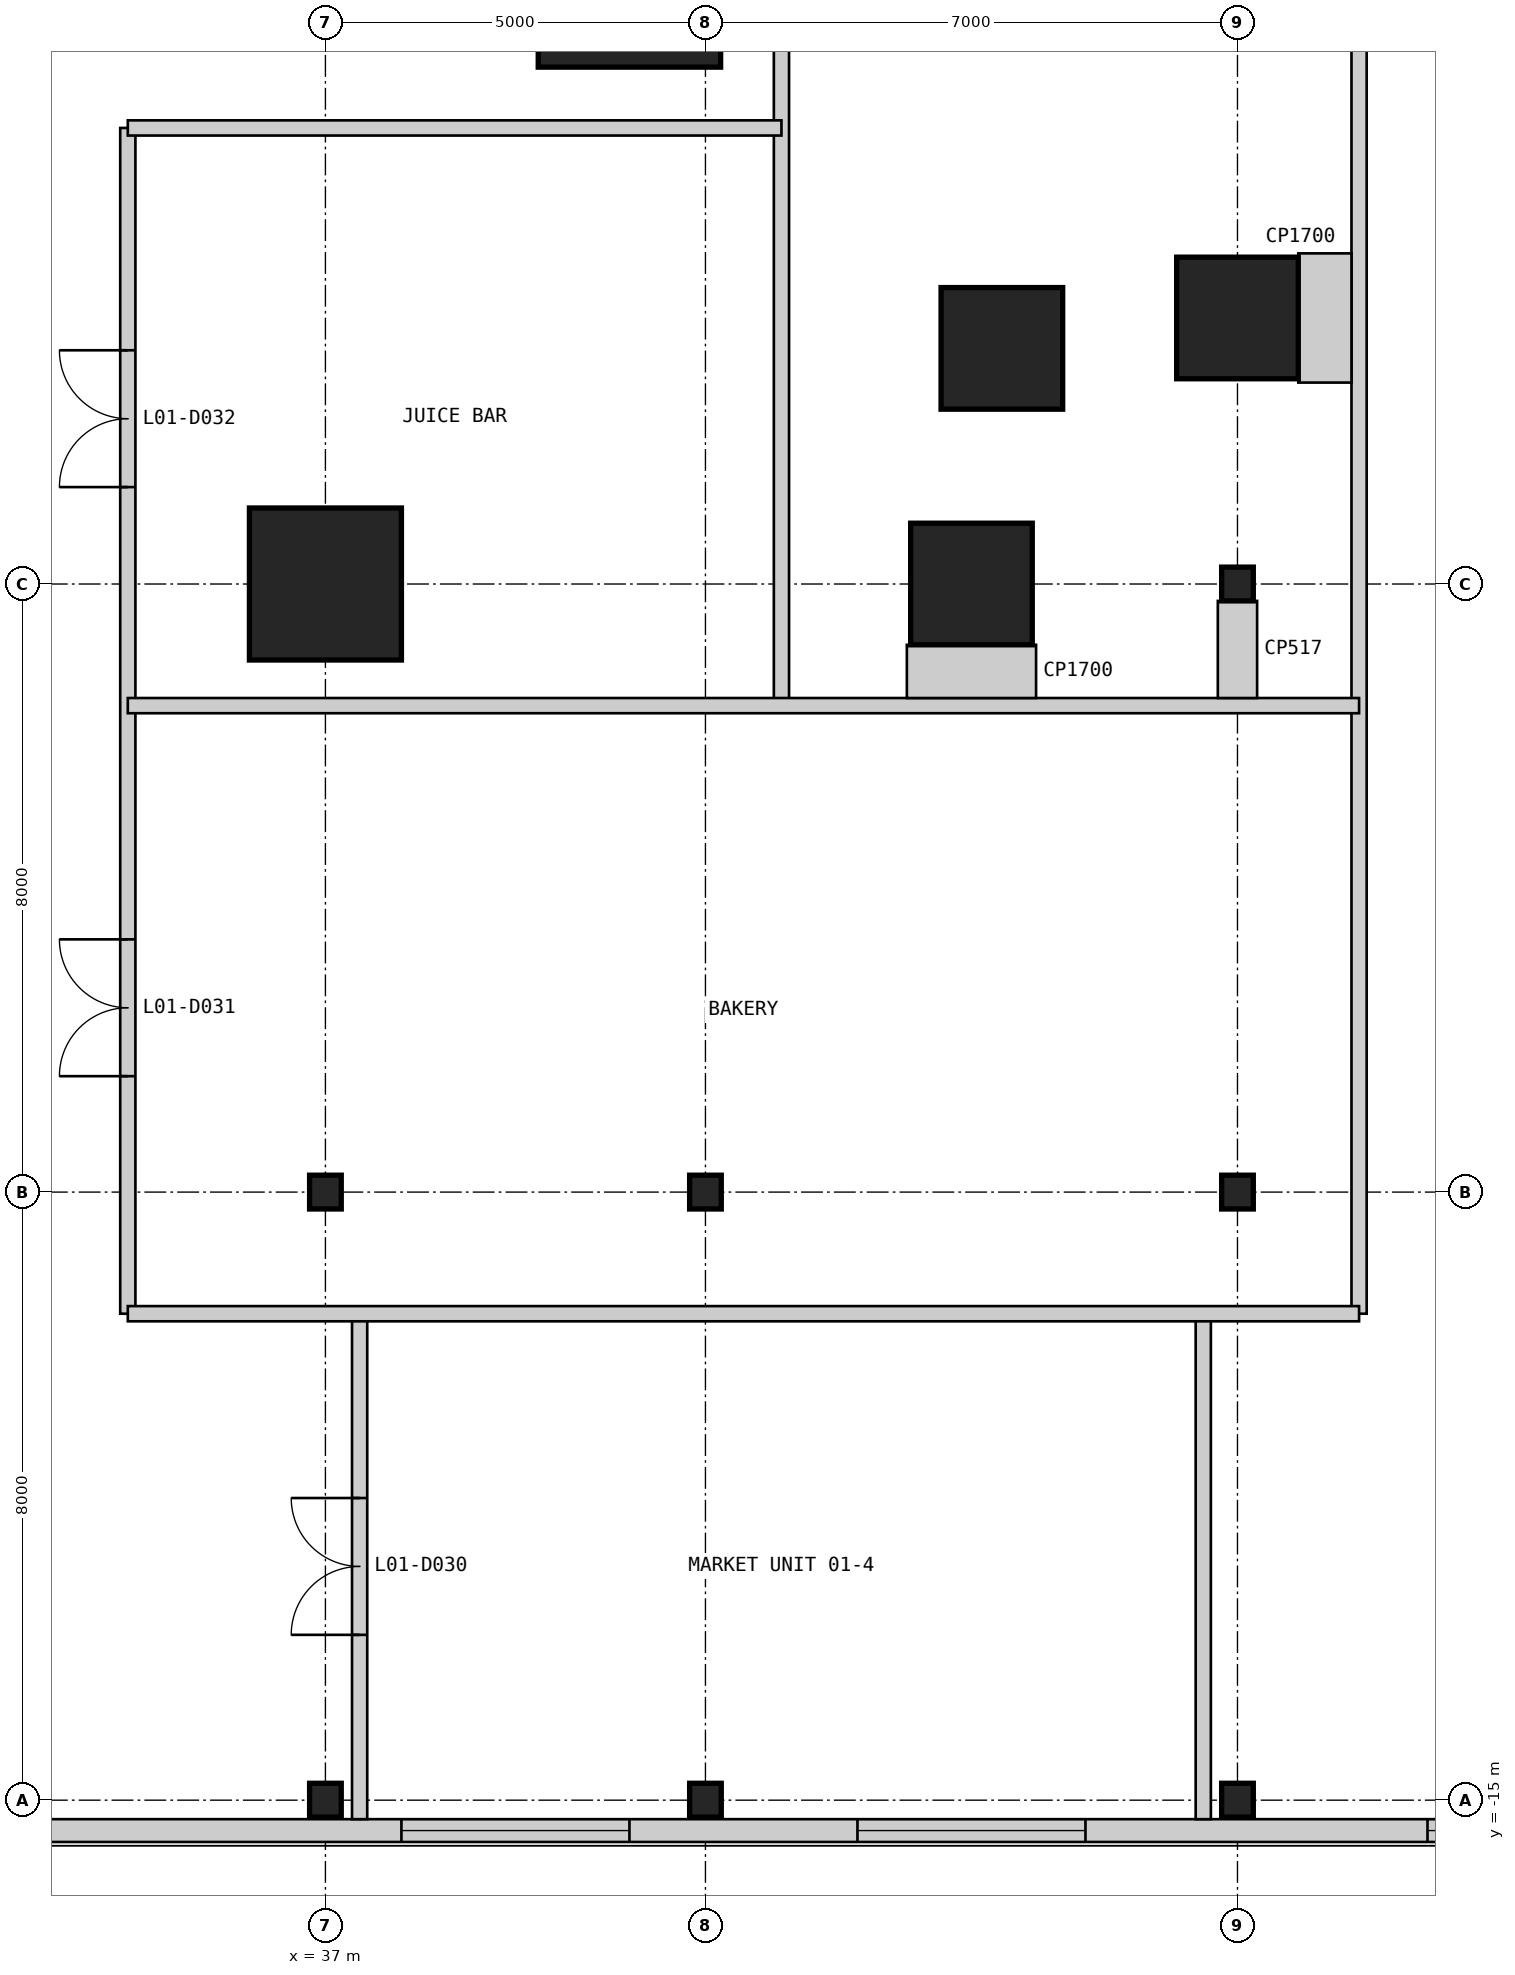
"""IFC4 building model, lengths in metres.
Left out: names, types, materials, properties, quantities, classifications, styles, units other than length and angle.
Written with IfcOpenShell. Run it as: python <this file> out.ifc"""

import sys

from ifc_helpers import new_model, si_unit, direction, frame, frame_2d, origin, origin_2d, place, context, subcontext, project, spatial, rectangle, i_section, extrude, element, fill, save


model = new_model("IFC4")
c1 = context("Model", 3, precision=1e-05, world=origin(), true_north=direction((0.0, 1.0)))
c2 = subcontext(c1, "Body", "Model", "MODEL_VIEW")
j1 = project(units=[si_unit("LENGTHUNIT", "METRE"), si_unit("PLANEANGLEUNIT", "RADIAN")], contexts=[c1])
p1 = place(None, origin())
s1 = spatial("IfcSite", under=j1, at=p1, CompositionType="ELEMENT")
p2 = place(p1, origin())
s2 = spatial("IfcBuilding", under=s1, at=p2, CompositionType="ELEMENT")
p3 = place(p2, frame((0.0, 0.0, 7.0)))
s3 = spatial("IfcBuildingStorey", under=s2, at=p3, CompositionType="ELEMENT", Elevation=7.0)
p4 = place(p3, frame((41.0, 9.0, 0.0), z_axis=(0.0, 0.0, 1.0), x_axis=(1.0, 0.0, 0.0)))
e1 = element("IfcColumn", 1, at=p4, inside=s3, PredefinedType="COLUMN", context=c2, shape_type="SweptSolid", body=[
    extrude(rectangle(XDim=2.4, YDim=2.4, at=origin_2d()), origin(), (0.0, 0.0, 1.0), 4.8),
])
p5 = place(p3, frame((37.0, 1.0, 0.0), z_axis=(0.0, 0.0, 1.0), x_axis=(1.0, 0.0, 0.0)))
e2 = element("IfcColumn", 2, at=p5, inside=s3, PredefinedType="COLUMN", context=c2, shape_type="SweptSolid", body=[
    extrude(rectangle(XDim=2.0, YDim=2.0, at=origin_2d()), origin(), (0.0, 0.0, 1.0), 4.8),
])
for number, where, z_axis, x_axis in (
    (3, (45.5, 1.0, 0.0), (0.0, 0.0, 1.0), (1.0, 0.0, 0.0)),
    (4, (45.9, 4.1, 0.0), (0.0, 0.0, 1.0), (1.0, 0.0, 0.0)),
    (5, (49.0, 4.5, 0.0), (0.0, 0.0, 1.0), (1.0, 0.0, 0.0)),
):
    element("IfcColumn", number, at=place(p3, frame(where, z_axis=z_axis, x_axis=x_axis)), inside=s3, PredefinedType="COLUMN", context=c2, shape_type="SweptSolid", body=[
        extrude(rectangle(XDim=1.6, YDim=1.6, at=origin_2d()), origin(), (0.0, 0.0, 1.0), 4.8),
    ])
for number, where, z_axis, x_axis in (
    (6, (37.0, -15.0, 0.0), (0.0, 0.0, 1.0), (1.0, 0.0, 0.0)),
    (7, (37.0, -7.0, 0.0), (0.0, 0.0, 1.0), (1.0, 0.0, 0.0)),
    (8, (42.0, -15.0, 0.0), (0.0, 0.0, 1.0), (1.0, 0.0, 0.0)),
    (9, (42.0, -7.0, 0.0), (0.0, 0.0, 1.0), (1.0, 0.0, 0.0)),
    (10, (49.0, -15.0, 0.0), (0.0, 0.0, 1.0), (1.0, 0.0, 0.0)),
    (11, (49.0, -7.0, 0.0), (0.0, 0.0, 1.0), (1.0, 0.0, 0.0)),
    (12, (49.0, 1.0, 0.0), (0.0, 0.0, 1.0), (1.0, 0.0, 0.0)),
):
    element("IfcColumn", number, at=place(p3, frame(where, z_axis=z_axis, x_axis=x_axis)), inside=s3, PredefinedType="COLUMN", context=c2, shape_type="SweptSolid", body=[
        extrude(i_section(OverallWidth=0.417, OverallDepth=0.445, WebThickness=0.039, FlangeThickness=0.063, at=origin_2d()), origin(), (0.0, 0.0, 1.0), 4.8),
    ])
p6 = place(p3, frame((-15.55, -15.4, 0.0), z_axis=(0.0, 0.0, 1.0), x_axis=(1.0, 0.0, 0.0)))
e13 = element("IfcWall", 13, at=p6, inside=s3, PredefinedType="SOLIDWALL", context=c2, shape_type="SweptSolid", body=[
    extrude(rectangle(XDim=81.1, YDim=0.3, at=frame_2d((40.55, 0.0))), origin(), (0.0, 0.0, 1.0), 4.5),
])
p7 = place(p6, frame((3.05, 0.0, 0.9)))
e14 = element("IfcOpeningElement", 14, at=p7, cuts=e13, PredefinedType="OPENING", context=c2, shape_type="SweptSolid", body=[
    extrude(rectangle(XDim=3.0, YDim=2.4, at=frame_2d((1.5, 1.2))), frame((0.0, 0.16, 0.0), z_axis=(0.0, -1.0, 0.0), x_axis=(1.0, 0.0, 0.0)), (0.0, 0.0, 1.0), 0.32),
])
p8 = place(p6, frame((11.05, 0.0, 0.9)))
e15 = element("IfcOpeningElement", 15, at=p8, cuts=e13, PredefinedType="OPENING", context=c2, shape_type="SweptSolid", body=[
    extrude(rectangle(XDim=3.0, YDim=2.4, at=frame_2d((1.5, 1.2))), frame((0.0, 0.16, 0.0), z_axis=(0.0, -1.0, 0.0), x_axis=(1.0, 0.0, 0.0)), (0.0, 0.0, 1.0), 0.32),
])
p9 = place(p6, frame((19.05, 0.0, 0.9)))
e16 = element("IfcOpeningElement", 16, at=p9, cuts=e13, PredefinedType="OPENING", context=c2, shape_type="SweptSolid", body=[
    extrude(rectangle(XDim=3.0, YDim=2.4, at=frame_2d((1.5, 1.2))), frame((0.0, 0.16, 0.0), z_axis=(0.0, -1.0, 0.0), x_axis=(1.0, 0.0, 0.0)), (0.0, 0.0, 1.0), 0.32),
])
p10 = place(p6, frame((33.05, 0.0, 0.9)))
e17 = element("IfcOpeningElement", 17, at=p10, cuts=e13, PredefinedType="OPENING", context=c2, shape_type="SweptSolid", body=[
    extrude(rectangle(XDim=3.0, YDim=2.4, at=frame_2d((1.5, 1.2))), frame((0.0, 0.16, 0.0), z_axis=(0.0, -1.0, 0.0), x_axis=(1.0, 0.0, 0.0)), (0.0, 0.0, 1.0), 0.32),
])
p11 = place(p6, frame((45.05, 0.0, 0.9)))
e18 = element("IfcOpeningElement", 18, at=p11, cuts=e13, PredefinedType="OPENING", context=c2, shape_type="SweptSolid", body=[
    extrude(rectangle(XDim=3.0, YDim=2.4, at=frame_2d((1.5, 1.2))), frame((0.0, 0.16, 0.0), z_axis=(0.0, -1.0, 0.0), x_axis=(1.0, 0.0, 0.0)), (0.0, 0.0, 1.0), 0.32),
])
p12 = place(p6, frame((53.55, 0.0, 0.9)))
e19 = element("IfcOpeningElement", 19, at=p12, cuts=e13, PredefinedType="OPENING", context=c2, shape_type="SweptSolid", body=[
    extrude(rectangle(XDim=3.0, YDim=2.4, at=frame_2d((1.5, 1.2))), frame((0.0, 0.16, 0.0), z_axis=(0.0, -1.0, 0.0), x_axis=(1.0, 0.0, 0.0)), (0.0, 0.0, 1.0), 0.32),
])
p13 = place(p6, frame((59.55, 0.0, 0.9)))
e20 = element("IfcOpeningElement", 20, at=p13, cuts=e13, PredefinedType="OPENING", context=c2, shape_type="SweptSolid", body=[
    extrude(rectangle(XDim=3.0, YDim=2.4, at=frame_2d((1.5, 1.2))), frame((0.0, 0.16, 0.0), z_axis=(0.0, -1.0, 0.0), x_axis=(1.0, 0.0, 0.0)), (0.0, 0.0, 1.0), 0.32),
])
p14 = place(p6, frame((67.05, 0.0, 0.9)))
e21 = element("IfcOpeningElement", 21, at=p14, cuts=e13, PredefinedType="OPENING", context=c2, shape_type="SweptSolid", body=[
    extrude(rectangle(XDim=3.0, YDim=2.4, at=frame_2d((1.5, 1.2))), frame((0.0, 0.16, 0.0), z_axis=(0.0, -1.0, 0.0), x_axis=(1.0, 0.0, 0.0)), (0.0, 0.0, 1.0), 0.32),
])
p15 = place(p6, frame((75.05, 0.0, 0.9)))
e22 = element("IfcOpeningElement", 22, at=p15, cuts=e13, PredefinedType="OPENING", context=c2, shape_type="SweptSolid", body=[
    extrude(rectangle(XDim=3.0, YDim=2.4, at=frame_2d((1.5, 1.2))), frame((0.0, 0.16, 0.0), z_axis=(0.0, -1.0, 0.0), x_axis=(1.0, 0.0, 0.0)), (0.0, 0.0, 1.0), 0.32),
])
p16 = place(p3, frame((34.4, -8.6, 0.0), z_axis=(0.0, 0.0, 1.0), x_axis=(0.0, 1.0, 0.0)))
e23 = element("IfcWall", 23, at=p16, inside=s3, PredefinedType="PARTITIONING", context=c2, shape_type="SweptSolid", body=[
    extrude(rectangle(XDim=15.6, YDim=0.2, at=frame_2d((7.8, 0.0))), origin(), (0.0, 0.0, 1.0), 4.5),
])
p17 = place(p16, frame((3.125, 0.0, 0.0)))
e24 = element("IfcOpeningElement", 24, at=p17, cuts=e23, PredefinedType="OPENING", context=c2, shape_type="SweptSolid", body=[
    extrude(rectangle(XDim=1.8, YDim=2.4, at=frame_2d((0.9, 1.2))), frame((0.0, 0.11, 0.0), z_axis=(0.0, -1.0, 0.0), x_axis=(1.0, 0.0, 0.0)), (0.0, 0.0, 1.0), 0.22),
])
p18 = place(p16, frame((10.875, 0.0, 0.0)))
e25 = element("IfcOpeningElement", 25, at=p18, cuts=e23, PredefinedType="OPENING", context=c2, shape_type="SweptSolid", body=[
    extrude(rectangle(XDim=1.8, YDim=2.4, at=frame_2d((0.9, 1.2))), frame((0.0, 0.11, 0.0), z_axis=(0.0, -1.0, 0.0), x_axis=(1.0, 0.0, 0.0)), (0.0, 0.0, 1.0), 0.22),
])
p19 = place(p3, frame((37.45, -15.25, 0.0), z_axis=(0.0, 0.0, 1.0), x_axis=(0.0, 1.0, 0.0)))
e26 = element("IfcWall", 26, at=p19, inside=s3, PredefinedType="PARTITIONING", context=c2, shape_type="SweptSolid", body=[
    extrude(rectangle(XDim=6.65, YDim=0.2, at=frame_2d((3.325, 0.0))), origin(), (0.0, 0.0, 1.0), 4.5),
])
p20 = place(p19, frame((2.425, 0.0, 0.0)))
e27 = element("IfcOpeningElement", 27, at=p20, cuts=e26, PredefinedType="OPENING", context=c2, shape_type="SweptSolid", body=[
    extrude(rectangle(XDim=1.8, YDim=2.4, at=frame_2d((0.9, 1.2))), frame((0.0, 0.11, 0.0), z_axis=(0.0, -1.0, 0.0), x_axis=(1.0, 0.0, 0.0)), (0.0, 0.0, 1.0), 0.22),
])
p21 = place(p3, frame((43.0, -0.6, 0.0), z_axis=(0.0, 0.0, 1.0), x_axis=(0.0, 1.0, 0.0)))
e28 = element("IfcWall", 28, at=p21, inside=s3, PredefinedType="PARTITIONING", context=c2, shape_type="SweptSolid", body=[
    extrude(rectangle(XDim=28.6, YDim=0.2, at=frame_2d((14.3, 0.0))), origin(), (0.0, 0.0, 1.0), 3.843),
])
p22 = place(p21, frame((10.85, 0.0, 0.0)))
e29 = element("IfcOpeningElement", 29, at=p22, cuts=e28, PredefinedType="OPENING", context=c2, shape_type="SweptSolid", body=[
    extrude(rectangle(XDim=0.9, YDim=2.2, at=frame_2d((0.45, 1.1))), frame((0.0, 0.11, 0.0), z_axis=(0.0, -1.0, 0.0), x_axis=(1.0, 0.0, 0.0)), (0.0, 0.0, 1.0), 0.22),
])
p23 = place(p3, frame((48.55, -15.25, 0.0), z_axis=(0.0, 0.0, 1.0), x_axis=(0.0, 1.0, 0.0)))
e30 = element("IfcWall", 30, at=p23, inside=s3, PredefinedType="PARTITIONING", context=c2, shape_type="SweptSolid", body=[
    extrude(rectangle(XDim=6.65, YDim=0.2, at=frame_2d((3.325, 0.0))), origin(), (0.0, 0.0, 1.0), 4.5),
])
p24 = place(p3, frame((50.6, -8.6, 0.0), z_axis=(0.0, 0.0, 1.0), x_axis=(0.0, 1.0, 0.0)))
e31 = element("IfcWall", 31, at=p24, inside=s3, PredefinedType="PARTITIONING", context=c2, shape_type="SweptSolid", body=[
    extrude(rectangle(XDim=24.2, YDim=0.2, at=frame_2d((12.1, 0.0))), origin(), (0.0, 0.0, 1.0), 4.5),
])
for number, where, z_axis, x_axis in (
    (32, (34.4, -8.6, 0.0), (0.0, 0.0, 1.0), (1.0, 0.0, 0.0)),
    (33, (34.4, -0.6, 0.0), (0.0, 0.0, 1.0), (1.0, 0.0, 0.0)),
):
    element("IfcWall", number, at=place(p3, frame(where, z_axis=z_axis, x_axis=x_axis)), inside=s3, PredefinedType="PARTITIONING", context=c2, shape_type="SweptSolid", body=[
        extrude(rectangle(XDim=16.2, YDim=0.2, at=frame_2d((8.1, 0.0))), origin(), (0.0, 0.0, 1.0), 4.5),
    ])
p25 = place(p3, frame((34.4, 7.0, 0.0), z_axis=(0.0, 0.0, 1.0), x_axis=(1.0, 0.0, 0.0)))
e34 = element("IfcWall", 34, at=p25, inside=s3, PredefinedType="PARTITIONING", context=c2, shape_type="SweptSolid", body=[
    extrude(rectangle(XDim=8.6, YDim=0.2, at=frame_2d((4.3, 0.0))), origin(), (0.0, 0.0, 1.0), 4.5),
])
for number, where, z_axis, x_axis in (
    (35, (45.5, -0.5, 0.0), (0.0, 0.0, 1.0), (0.0, 1.0, 0.0)),
    (36, (50.5, 4.5, 0.0), (0.0, 0.0, 1.0), (-1.0, 0.0, 0.0)),
):
    element("IfcWall", number, at=place(p3, frame(where, z_axis=z_axis, x_axis=x_axis)), inside=s3, PredefinedType="PARTITIONING", context=c2, shape_type="SweptSolid", body=[
        extrude(rectangle(XDim=0.7, YDim=1.7, at=frame_2d((0.35, 0.0))), origin(), (0.0, 0.0, 1.0), 4.5),
    ])
p26 = place(p3, frame((49.0, -0.5, 0.0), z_axis=(0.0, 0.0, 1.0), x_axis=(0.0, 1.0, 0.0)))
e37 = element("IfcWall", 37, at=p26, inside=s3, PredefinedType="PARTITIONING", context=c2, shape_type="SweptSolid", body=[
    extrude(rectangle(XDim=1.278, YDim=0.517, at=frame_2d((0.639, 0.0))), origin(), (0.0, 0.0, 1.0), 3.754),
])
p27 = place(p12, origin())
e38 = element("IfcWindow", 38, at=p27, inside=s3, PartitioningType="SINGLE_PANEL", PredefinedType="WINDOW", context=c2, shape_type="SweptSolid", body=[
    extrude(rectangle(XDim=3.0, YDim=2.4, at=frame_2d((1.5, 1.2))), frame((0.0, 0.03, 0.0), z_axis=(0.0, -1.0, 0.0), x_axis=(1.0, 0.0, 0.0)), (0.0, 0.0, 1.0), 0.06),
])
fill(e19, e38)
p28 = place(p13, origin())
e39 = element("IfcWindow", 39, at=p28, inside=s3, PartitioningType="SINGLE_PANEL", PredefinedType="WINDOW", context=c2, shape_type="SweptSolid", body=[
    extrude(rectangle(XDim=3.0, YDim=2.4, at=frame_2d((1.5, 1.2))), frame((0.0, 0.03, 0.0), z_axis=(0.0, -1.0, 0.0), x_axis=(1.0, 0.0, 0.0)), (0.0, 0.0, 1.0), 0.06),
])
fill(e20, e39)
p29 = place(p14, origin())
e40 = element("IfcWindow", 40, at=p29, inside=s3, PartitioningType="SINGLE_PANEL", PredefinedType="WINDOW", context=c2, shape_type="SweptSolid", body=[
    extrude(rectangle(XDim=3.0, YDim=2.4, at=frame_2d((1.5, 1.2))), frame((0.0, 0.03, 0.0), z_axis=(0.0, -1.0, 0.0), x_axis=(1.0, 0.0, 0.0)), (0.0, 0.0, 1.0), 0.06),
])
fill(e21, e40)
p30 = place(p20, origin())
e41 = element("IfcDoor", 41, at=p30, inside=s3, OperationType="DOUBLE_DOOR_SINGLE_SWING", PredefinedType="DOOR", context=c2, shape_type="SweptSolid", body=[
    extrude(rectangle(XDim=1.8, YDim=2.4, at=frame_2d((0.9, 1.2))), frame((0.0, 0.025, 0.0), z_axis=(0.0, -1.0, 0.0), x_axis=(1.0, 0.0, 0.0)), (0.0, 0.0, 1.0), 0.05),
])
fill(e27, e41)
p31 = place(p17, origin())
e42 = element("IfcDoor", 42, at=p31, inside=s3, OperationType="DOUBLE_DOOR_SINGLE_SWING", PredefinedType="DOOR", context=c2, shape_type="SweptSolid", body=[
    extrude(rectangle(XDim=1.8, YDim=2.4, at=frame_2d((0.9, 1.2))), frame((0.0, 0.025, 0.0), z_axis=(0.0, -1.0, 0.0), x_axis=(1.0, 0.0, 0.0)), (0.0, 0.0, 1.0), 0.05),
])
fill(e24, e42)
p32 = place(p18, origin())
e43 = element("IfcDoor", 43, at=p32, inside=s3, OperationType="DOUBLE_DOOR_SINGLE_SWING", PredefinedType="DOOR", context=c2, shape_type="SweptSolid", body=[
    extrude(rectangle(XDim=1.8, YDim=2.4, at=frame_2d((0.9, 1.2))), frame((0.0, 0.025, 0.0), z_axis=(0.0, -1.0, 0.0), x_axis=(1.0, 0.0, 0.0)), (0.0, 0.0, 1.0), 0.05),
])
fill(e25, e43)
save(model, sys.argv[1])
